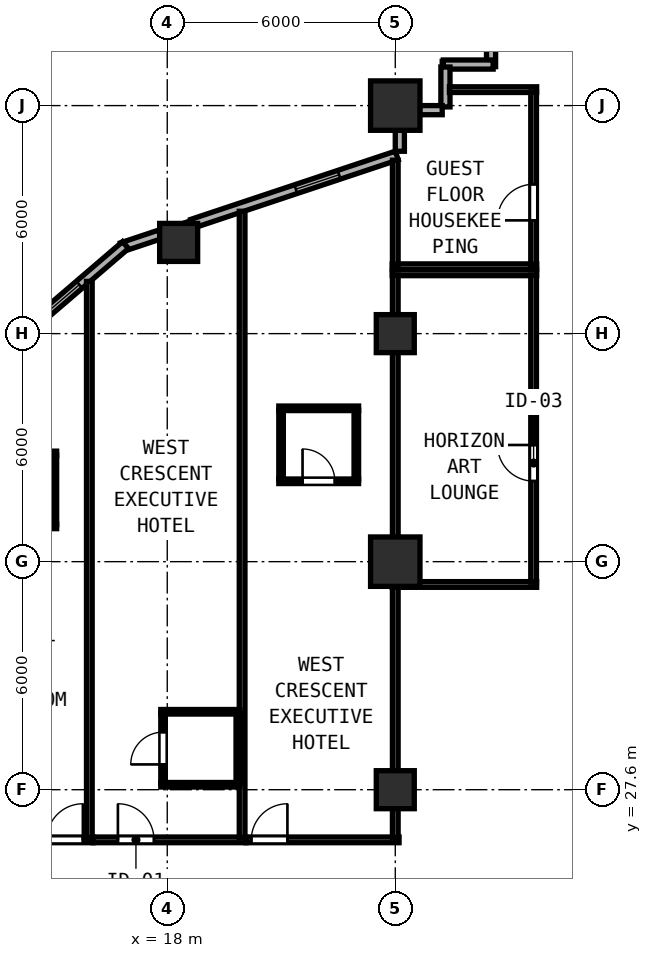
"""IFC4 building model, lengths in metres.
Left out: names, types, materials, properties, quantities, classifications, styles, units other than length and angle.
Written with IfcOpenShell. Run it as: python <this file> out.ifc"""

import sys

from ifc_helpers import new_model, si_unit, direction, frame, frame_2d, origin, origin_2d, place, context, subcontext, project, spatial, rectangle, hollow_rectangle, extrude, element, fill, save


model = new_model("IFC4")
c1 = context("Model", 3, precision=1e-05, world=origin(), true_north=direction((0.0, 1.0)))
c2 = subcontext(c1, "Body", "Model", "MODEL_VIEW")
j1 = project(units=[si_unit("LENGTHUNIT", "METRE"), si_unit("PLANEANGLEUNIT", "RADIAN")], contexts=[c1])
p1 = place(None, origin())
s1 = spatial("IfcSite", under=j1, at=p1, CompositionType="ELEMENT")
p2 = place(p1, origin())
s2 = spatial("IfcBuilding", under=s1, at=p2, CompositionType="ELEMENT")
p3 = place(p2, frame((0.0, 0.0, 39.2)))
s3 = spatial("IfcBuildingStorey", under=s2, at=p3, CompositionType="ELEMENT", Elevation=39.2)
for number, where, z_axis, x_axis in (
    (1, (24.0, 33.6, 0.0), (0.0, 0.0, 1.0), (1.0, 0.0, 0.0)),
    (2, (24.0, 45.6, 0.0), (0.0, 0.0, 1.0), (1.0, 0.0, 0.0)),
):
    element("IfcColumn", number, at=place(p3, frame(where, z_axis=z_axis, x_axis=x_axis)), inside=s3, PredefinedType="COLUMN", context=c2, shape_type="SweptSolid", body=[
        extrude(hollow_rectangle(XDim=1.3, YDim=1.3, WallThickness=0.048, at=origin_2d()), origin(), (0.0, 0.0, 1.0), 3.8),
    ])
for number, where, z_axis, x_axis in (
    (3, (24.0, 27.6, 0.0), (0.0, 0.0, 1.0), (1.0, 0.0, 0.0)),
    (4, (24.0, 39.6, 0.0), (0.0, 0.0, 1.0), (1.0, 0.0, 0.0)),
    (5, (18.3, 42.0, 0.0), (0.0, 0.0, 1.0), (1.0, 0.0, 0.0)),
):
    element("IfcColumn", number, at=place(p3, frame(where, z_axis=z_axis, x_axis=x_axis)), inside=s3, PredefinedType="COLUMN", context=c2, shape_type="SweptSolid", body=[
        extrude(hollow_rectangle(XDim=1.0, YDim=1.0, WallThickness=0.038, at=origin_2d()), origin(), (0.0, 0.0, 1.0), 3.8),
    ])
p4 = place(p3, frame((26.52, 47.995, 0.0), z_axis=(0.0, 0.0, 1.0), x_axis=(0.0, -1.0, 0.0)))
e6 = element("IfcWall", 6, at=p4, inside=s3, PredefinedType="SOLIDWALL", context=c2, shape_type="SweptSolid", body=[
    extrude(rectangle(XDim=1.37, YDim=0.24, at=frame_2d((0.685, 0.0))), origin(), (0.0, 0.0, 1.0), 3.54),
])
p5 = place(p3, frame((26.575, 46.68, 0.0), z_axis=(0.0, 0.0, 1.0), x_axis=(-1.0, 0.0, 0.0)))
e7 = element("IfcWall", 7, at=p5, inside=s3, PredefinedType="SOLIDWALL", context=c2, shape_type="SweptSolid", body=[
    extrude(rectangle(XDim=1.31, YDim=0.24, at=frame_2d((0.655, 0.0))), origin(), (0.0, 0.0, 1.0), 3.54),
])
p6 = place(p3, frame((25.32, 46.615, 0.0), z_axis=(0.0, 0.0, 1.0), x_axis=(0.0, -1.0, 0.0)))
e8 = element("IfcWall", 8, at=p6, inside=s3, PredefinedType="SOLIDWALL", context=c2, shape_type="SweptSolid", body=[
    extrude(rectangle(XDim=1.05, YDim=0.24, at=frame_2d((0.525, 0.0))), origin(), (0.0, 0.0, 1.0), 3.54),
])
p7 = place(p3, frame((25.235, 45.48, 0.0), z_axis=(0.0, 0.0, 1.0), x_axis=(-1.0, 0.0, 0.0)))
e9 = element("IfcWall", 9, at=p7, inside=s3, PredefinedType="SOLIDWALL", context=c2, shape_type="SweptSolid", body=[
    extrude(rectangle(XDim=0.593, YDim=0.24, at=frame_2d((0.296, 0.0))), origin(), (0.0, 0.0, 1.0), 3.54),
])
p8 = place(p3, frame((24.12, 44.958, 0.0), z_axis=(0.0, 0.0, 1.0), x_axis=(0.0, -1.0, 0.0)))
e10 = element("IfcWall", 10, at=p8, inside=s3, PredefinedType="SOLIDWALL", context=c2, shape_type="SweptSolid", body=[
    extrude(rectangle(XDim=0.56, YDim=0.24, at=frame_2d((0.28, 0.0))), origin(), (0.0, 0.0, 1.0), 3.037),
])
p9 = place(p3, frame((24.039, 44.287, 0.0), z_axis=(0.0, 0.0, 1.0), x_axis=(-0.948678995954, -0.316240672014, 0.0)))
e11 = element("IfcWall", 11, at=p9, inside=s3, PredefinedType="SOLIDWALL", context=c2, shape_type="SweptSolid", body=[
    extrude(rectangle(XDim=5.675, YDim=0.24, at=frame_2d((2.837, 0.0))), origin(), (0.0, 0.0, 1.0), 3.037),
])
p10 = place(p9, frame((1.6, 0.0, 0.85)))
e12 = element("IfcOpeningElement", 12, at=p10, cuts=e11, PredefinedType="OPENING", context=c2, shape_type="SweptSolid", body=[
    extrude(rectangle(XDim=1.2, YDim=1.85, at=frame_2d((0.6, 0.925))), frame((0.0, 0.13, 0.0), z_axis=(0.0, -1.0, 0.0), x_axis=(1.0, 0.0, 0.0)), (0.0, 0.0, 1.0), 0.26),
])
p11 = place(p3, frame((17.808, 42.209, 0.0), z_axis=(0.0, 0.0, 1.0), x_axis=(-0.948706457285, -0.316158279832, 0.0)))
e13 = element("IfcWall", 13, at=p11, inside=s3, PredefinedType="SOLIDWALL", context=c2, shape_type="SweptSolid", body=[
    extrude(rectangle(XDim=1.054, YDim=0.24, at=frame_2d((0.527, 0.0))), origin(), (0.0, 0.0, 1.0), 3.54),
])
p12 = place(p3, frame((16.902, 41.929, 0.0), z_axis=(0.0, 0.0, 1.0), x_axis=(-0.759275136126, -0.650769750112, 0.0)))
e14 = element("IfcWall", 14, at=p12, inside=s3, PredefinedType="SOLIDWALL", context=c2, shape_type="SweptSolid", body=[
    extrude(rectangle(XDim=3.719, YDim=0.24, at=frame_2d((1.86, 0.0))), origin(), (0.0, 0.0, 1.0), 3.54),
])
p13 = place(p12, frame((1.6, 0.0, 0.85)))
e15 = element("IfcOpeningElement", 15, at=p13, cuts=e14, PredefinedType="OPENING", context=c2, shape_type="SweptSolid", body=[
    extrude(rectangle(XDim=1.2, YDim=1.85, at=frame_2d((0.6, 0.925))), frame((0.0, 0.13, 0.0), z_axis=(0.0, -1.0, 0.0), x_axis=(1.0, 0.0, 0.0)), (0.0, 0.0, 1.0), 0.26),
])
for number, where, z_axis, x_axis in (
    (16, (23.92, 41.2, 0.0), (0.0, 0.0, 1.0), (1.0, 0.0, 0.0)),
    (17, (23.92, 33.0, 0.0), (0.0, 0.0, 1.0), (1.0, 0.0, 0.0)),
):
    element("IfcWall", number, at=place(p3, frame(where, z_axis=z_axis, x_axis=x_axis)), inside=s3, PredefinedType="PARTITIONING", context=c2, shape_type="SweptSolid", body=[
        extrude(rectangle(XDim=3.8, YDim=0.15, at=frame_2d((1.9, 0.0))), origin(), (0.0, 0.0, 1.0), 3.54),
    ])
p14 = place(p3, frame((24.0, 33.06, 0.0), z_axis=(0.0, 0.0, 1.0), x_axis=(0.0, 1.0, 0.0)))
e18 = element("IfcWall", 18, at=p14, inside=s3, PredefinedType="PARTITIONING", context=c2, shape_type="SweptSolid", body=[
    extrude(rectangle(XDim=8.08, YDim=0.15, at=frame_2d((4.04, 0.0))), origin(), (0.0, 0.0, 1.0), 3.037),
])
p15 = place(p3, frame((27.64, 33.06, 0.0), z_axis=(0.0, 0.0, 1.0), x_axis=(0.0, 1.0, 0.0)))
e19 = element("IfcWall", 19, at=p15, inside=s3, PredefinedType="PARTITIONING", context=c2, shape_type="SweptSolid", body=[
    extrude(rectangle(XDim=8.08, YDim=0.15, at=frame_2d((4.04, 0.0))), origin(), (0.0, 0.0, 1.0), 3.54),
])
p16 = place(p15, frame((3.61, 0.0, 0.0), z_axis=(0.0, 0.0, 1.0), x_axis=(-1.0, 0.0, 0.0)))
e20 = element("IfcOpeningElement", 20, at=p16, cuts=e19, PredefinedType="OPENING", context=c2, shape_type="SweptSolid", body=[
    extrude(rectangle(XDim=0.95, YDim=2.12, at=frame_2d((0.475, 1.06))), frame((0.0, 0.085, 0.0), z_axis=(0.0, -1.0, 0.0), x_axis=(1.0, 0.0, 0.0)), (0.0, 0.0, 1.0), 0.17),
])
p17 = place(p3, frame((25.425, 46.02, 0.0), z_axis=(0.0, 0.0, 1.0), x_axis=(1.0, 0.0, 0.0)))
e21 = element("IfcWall", 21, at=p17, inside=s3, PredefinedType="PARTITIONING", context=c2, shape_type="SweptSolid", body=[
    extrude(rectangle(XDim=2.295, YDim=0.15, at=frame_2d((1.147, 0.0))), origin(), (0.0, 0.0, 1.0), 3.54),
])
p18 = place(p3, frame((23.92, 41.36, 0.0), z_axis=(0.0, 0.0, 1.0), x_axis=(1.0, 0.0, 0.0)))
e22 = element("IfcWall", 22, at=p18, inside=s3, PredefinedType="PARTITIONING", context=c2, shape_type="SweptSolid", body=[
    extrude(rectangle(XDim=3.8, YDim=0.15, at=frame_2d((1.9, 0.0))), origin(), (0.0, 0.0, 1.0), 3.54),
])
p19 = place(p3, frame((24.0, 41.42, 0.0), z_axis=(0.0, 0.0, 1.0), x_axis=(0.0, 1.0, 0.0)))
e23 = element("IfcWall", 23, at=p19, inside=s3, PredefinedType="PARTITIONING", context=c2, shape_type="SweptSolid", body=[
    extrude(rectangle(XDim=2.743, YDim=0.15, at=frame_2d((1.372, 0.0))), origin(), (0.0, 0.0, 1.0), 3.037),
])
p20 = place(p3, frame((27.64, 41.42, 0.0), z_axis=(0.0, 0.0, 1.0), x_axis=(0.0, 1.0, 0.0)))
e24 = element("IfcWall", 24, at=p20, inside=s3, PredefinedType="PARTITIONING", context=c2, shape_type="SweptSolid", body=[
    extrude(rectangle(XDim=4.54, YDim=0.15, at=frame_2d((2.27, 0.0))), origin(), (0.0, 0.0, 1.0), 3.54),
])
p21 = place(p20, frame((2.11, 0.0, 0.0), z_axis=(0.0, 0.0, 1.0), x_axis=(-1.0, 0.0, 0.0)))
e25 = element("IfcOpeningElement", 25, at=p21, cuts=e24, PredefinedType="OPENING", context=c2, shape_type="SweptSolid", body=[
    extrude(rectangle(XDim=0.95, YDim=2.12, at=frame_2d((0.475, 1.06))), frame((0.0, 0.085, 0.0), z_axis=(0.0, -1.0, 0.0), x_axis=(1.0, 0.0, 0.0)), (0.0, 0.0, 1.0), 0.17),
])
p22 = place(p3, frame((11.7, 26.28, 0.0), z_axis=(0.0, 0.0, 1.0), x_axis=(1.0, 0.0, 0.0)))
e26 = element("IfcWall", 26, at=p22, inside=s3, PredefinedType="PARTITIONING", context=c2, shape_type="SweptSolid", body=[
    extrude(rectangle(XDim=4.35, YDim=0.15, at=frame_2d((2.175, 0.0))), origin(), (0.0, 0.0, 1.0), 3.54),
])
p23 = place(p22, frame((3.13, 0.0, 0.0)))
e27 = element("IfcOpeningElement", 27, at=p23, cuts=e26, PredefinedType="OPENING", context=c2, shape_type="SweptSolid", body=[
    extrude(rectangle(XDim=0.95, YDim=2.15, at=frame_2d((0.475, 1.075))), frame((0.0, 0.085, 0.0), z_axis=(0.0, -1.0, 0.0), x_axis=(1.0, 0.0, 0.0)), (0.0, 0.0, 1.0), 0.17),
])
p24 = place(p3, frame((15.95, 26.34, 0.0), z_axis=(0.0, 0.0, 1.0), x_axis=(0.0, 1.0, 0.0)))
e28 = element("IfcWall", 28, at=p24, inside=s3, PredefinedType="PARTITIONING", context=c2, shape_type="SweptSolid", body=[
    extrude(rectangle(XDim=14.635, YDim=0.15, at=frame_2d((7.317, 0.0))), origin(), (0.0, 0.0, 1.0), 3.54),
])
p25 = place(p3, frame((12.99, 36.448, 0.0), z_axis=(0.0, 0.0, 1.0), x_axis=(1.0, 0.0, 0.0)))
e29 = element("IfcWall", 29, at=p25, inside=s3, PredefinedType="PARTITIONING", context=c2, shape_type="SweptSolid", body=[
    extrude(rectangle(XDim=2.1, YDim=0.12, at=frame_2d((1.05, 0.0))), origin(), (0.0, 0.0, 1.0), 3.54),
])
p26 = place(p3, frame((12.99, 34.528, 0.0), z_axis=(0.0, 0.0, 1.0), x_axis=(1.0, 0.0, 0.0)))
e30 = element("IfcWall", 30, at=p26, inside=s3, PredefinedType="PARTITIONING", context=c2, shape_type="SweptSolid", body=[
    extrude(rectangle(XDim=2.1, YDim=0.12, at=frame_2d((1.05, 0.0))), origin(), (0.0, 0.0, 1.0), 3.54),
])
p27 = place(p26, frame((0.625, 0.0, 0.0)))
e31 = element("IfcOpeningElement", 31, at=p27, cuts=e30, PredefinedType="OPENING", context=c2, shape_type="SweptSolid", body=[
    extrude(rectangle(XDim=0.85, YDim=2.1, at=frame_2d((0.425, 1.05))), frame((0.0, 0.07, 0.0), z_axis=(0.0, -1.0, 0.0), x_axis=(1.0, 0.0, 0.0)), (0.0, 0.0, 1.0), 0.14),
])
p28 = place(p3, frame((15.03, 34.573, 0.0), z_axis=(0.0, 0.0, 1.0), x_axis=(0.0, 1.0, 0.0)))
e32 = element("IfcWall", 32, at=p28, inside=s3, PredefinedType="PARTITIONING", context=c2, shape_type="SweptSolid", body=[
    extrude(rectangle(XDim=1.83, YDim=0.12, at=frame_2d((0.915, 0.0))), origin(), (0.0, 0.0, 1.0), 3.54),
])
p29 = place(p3, frame((16.052, 26.28, 0.0), z_axis=(0.0, 0.0, 1.0), x_axis=(1.0, 0.0, 0.0)))
e33 = element("IfcWall", 33, at=p29, inside=s3, PredefinedType="PARTITIONING", context=c2, shape_type="SweptSolid", body=[
    extrude(rectangle(XDim=4.018, YDim=0.15, at=frame_2d((2.009, 0.0))), origin(), (0.0, 0.0, 1.0), 3.54),
])
p30 = place(p29, frame((0.649, 0.0, 0.0)))
e34 = element("IfcOpeningElement", 34, at=p30, cuts=e33, PredefinedType="OPENING", context=c2, shape_type="SweptSolid", body=[
    extrude(rectangle(XDim=0.95, YDim=2.18, at=frame_2d((0.475, 1.09))), frame((0.0, 0.085, 0.0), z_axis=(0.0, -1.0, 0.0), x_axis=(1.0, 0.0, 0.0)), (0.0, 0.0, 1.0), 0.17),
])
p31 = place(p3, frame((19.97, 26.34, 0.0), z_axis=(0.0, 0.0, 1.0), x_axis=(0.0, 1.0, 0.0)))
e35 = element("IfcWall", 35, at=p31, inside=s3, PredefinedType="PARTITIONING", context=c2, shape_type="SweptSolid", body=[
    extrude(rectangle(XDim=16.479, YDim=0.15, at=frame_2d((8.24, 0.0))), origin(), (0.0, 0.0, 1.0), 3.54),
])
p32 = place(p3, frame((17.83, 29.65, 0.0), z_axis=(0.0, 0.0, 1.0), x_axis=(1.0, 0.0, 0.0)))
e36 = element("IfcWall", 36, at=p32, inside=s3, PredefinedType="PARTITIONING", context=c2, shape_type="SweptSolid", body=[
    extrude(rectangle(XDim=2.08, YDim=0.12, at=frame_2d((1.04, 0.0))), origin(), (0.0, 0.0, 1.0), 3.54),
])
p33 = place(p3, frame((17.83, 27.73, 0.0), z_axis=(0.0, 0.0, 1.0), x_axis=(1.0, 0.0, 0.0)))
e37 = element("IfcWall", 37, at=p33, inside=s3, PredefinedType="PARTITIONING", context=c2, shape_type="SweptSolid", body=[
    extrude(rectangle(XDim=2.08, YDim=0.12, at=frame_2d((1.04, 0.0))), origin(), (0.0, 0.0, 1.0), 3.037),
])
p34 = place(p3, frame((17.89, 27.775, 0.0), z_axis=(0.0, 0.0, 1.0), x_axis=(0.0, 1.0, 0.0)))
e38 = element("IfcWall", 38, at=p34, inside=s3, PredefinedType="PARTITIONING", context=c2, shape_type="SweptSolid", body=[
    extrude(rectangle(XDim=1.83, YDim=0.12, at=frame_2d((0.915, 0.0))), origin(), (0.0, 0.0, 1.0), 3.54),
])
p35 = place(p34, frame((1.34, 0.0, 0.0), z_axis=(0.0, 0.0, 1.0), x_axis=(-1.0, 0.0, 0.0)))
e39 = element("IfcOpeningElement", 39, at=p35, cuts=e38, PredefinedType="OPENING", context=c2, shape_type="SweptSolid", body=[
    extrude(rectangle(XDim=0.85, YDim=2.1, at=frame_2d((0.425, 1.05))), frame((0.0, 0.07, 0.0), z_axis=(0.0, -1.0, 0.0), x_axis=(1.0, 0.0, 0.0)), (0.0, 0.0, 1.0), 0.14),
])
p36 = place(p3, frame((19.87, 27.775, 0.0), z_axis=(0.0, 0.0, 1.0), x_axis=(0.0, 1.0, 0.0)))
e40 = element("IfcWall", 40, at=p36, inside=s3, PredefinedType="PARTITIONING", context=c2, shape_type="SweptSolid", body=[
    extrude(rectangle(XDim=1.83, YDim=0.12, at=frame_2d((0.915, 0.0))), origin(), (0.0, 0.0, 1.0), 3.54),
])
p37 = place(p3, frame((20.072, 26.28, 0.0), z_axis=(0.0, 0.0, 1.0), x_axis=(1.0, 0.0, 0.0)))
e41 = element("IfcWall", 41, at=p37, inside=s3, PredefinedType="PARTITIONING", context=c2, shape_type="SweptSolid", body=[
    extrude(rectangle(XDim=4.028, YDim=0.15, at=frame_2d((2.014, 0.0))), origin(), (0.0, 0.0, 1.0), 3.54),
])
p38 = place(p37, frame((0.14, 0.0, 0.0)))
e42 = element("IfcOpeningElement", 42, at=p38, cuts=e41, PredefinedType="OPENING", context=c2, shape_type="SweptSolid", body=[
    extrude(rectangle(XDim=0.95, YDim=2.18, at=frame_2d((0.475, 1.09))), frame((0.0, 0.085, 0.0), z_axis=(0.0, -1.0, 0.0), x_axis=(1.0, 0.0, 0.0)), (0.0, 0.0, 1.0), 0.17),
])
p39 = place(p3, frame((24.0, 26.34, 0.0), z_axis=(0.0, 0.0, 1.0), x_axis=(0.0, 1.0, 0.0)))
e43 = element("IfcWall", 43, at=p39, inside=s3, PredefinedType="PARTITIONING", context=c2, shape_type="SweptSolid", body=[
    extrude(rectangle(XDim=6.6, YDim=0.15, at=frame_2d((3.3, 0.0))), origin(), (0.0, 0.0, 1.0), 3.037),
])
p40 = place(p3, frame((20.935, 37.635, 0.0), z_axis=(0.0, 0.0, 1.0), x_axis=(1.0, 0.0, 0.0)))
e44 = element("IfcWall", 44, at=p40, inside=s3, PredefinedType="PARTITIONING", context=c2, shape_type="SweptSolid", body=[
    extrude(rectangle(XDim=2.1, YDim=0.12, at=frame_2d((1.05, 0.0))), origin(), (0.0, 0.0, 1.0), 3.54),
])
p41 = place(p3, frame((20.935, 35.715, 0.0), z_axis=(0.0, 0.0, 1.0), x_axis=(1.0, 0.0, 0.0)))
e45 = element("IfcWall", 45, at=p41, inside=s3, PredefinedType="PARTITIONING", context=c2, shape_type="SweptSolid", body=[
    extrude(rectangle(XDim=2.1, YDim=0.12, at=frame_2d((1.05, 0.0))), origin(), (0.0, 0.0, 1.0), 3.54),
])
p42 = place(p41, frame((0.625, 0.0, 0.0)))
e46 = element("IfcOpeningElement", 46, at=p42, cuts=e45, PredefinedType="OPENING", context=c2, shape_type="SweptSolid", body=[
    extrude(rectangle(XDim=0.85, YDim=2.1, at=frame_2d((0.425, 1.05))), frame((0.0, 0.07, 0.0), z_axis=(0.0, -1.0, 0.0), x_axis=(1.0, 0.0, 0.0)), (0.0, 0.0, 1.0), 0.14),
])
for number, where, z_axis, x_axis in (
    (47, (20.995, 35.76, 0.0), (0.0, 0.0, 1.0), (0.0, 1.0, 0.0)),
    (48, (22.975, 35.76, 0.0), (0.0, 0.0, 1.0), (0.0, 1.0, 0.0)),
):
    element("IfcWall", number, at=place(p3, frame(where, z_axis=z_axis, x_axis=x_axis)), inside=s3, PredefinedType="PARTITIONING", context=c2, shape_type="SweptSolid", body=[
        extrude(rectangle(XDim=1.83, YDim=0.12, at=frame_2d((0.915, 0.0))), origin(), (0.0, 0.0, 1.0), 3.54),
    ])
p43 = place(p10, origin())
e49 = element("IfcWindow", 49, at=p43, inside=s3, PartitioningType="SINGLE_PANEL", PredefinedType="WINDOW", context=c2, shape_type="SweptSolid", body=[
    extrude(rectangle(XDim=1.2, YDim=1.85, at=frame_2d((0.6, 0.925))), frame((0.0, 0.03, 0.0), z_axis=(0.0, -1.0, 0.0), x_axis=(1.0, 0.0, 0.0)), (0.0, 0.0, 1.0), 0.06),
])
fill(e12, e49)
p44 = place(p13, origin())
e50 = element("IfcWindow", 50, at=p44, inside=s3, PartitioningType="SINGLE_PANEL", PredefinedType="WINDOW", context=c2, shape_type="SweptSolid", body=[
    extrude(rectangle(XDim=1.2, YDim=1.85, at=frame_2d((0.6, 0.925))), frame((0.0, 0.03, 0.0), z_axis=(0.0, -1.0, 0.0), x_axis=(1.0, 0.0, 0.0)), (0.0, 0.0, 1.0), 0.06),
])
fill(e15, e50)
p45 = place(p16, origin())
e51 = element("IfcDoor", 51, at=p45, inside=s3, OperationType="SINGLE_SWING_LEFT", PredefinedType="DOOR", context=c2, shape_type="SweptSolid", body=[
    extrude(rectangle(XDim=0.95, YDim=2.12, at=frame_2d((0.475, 1.06))), frame((0.0, 0.025, 0.0), z_axis=(0.0, -1.0, 0.0), x_axis=(1.0, 0.0, 0.0)), (0.0, 0.0, 1.0), 0.05),
])
fill(e20, e51)
p46 = place(p21, origin())
e52 = element("IfcDoor", 52, at=p46, inside=s3, OperationType="SINGLE_SWING_RIGHT", PredefinedType="DOOR", context=c2, shape_type="SweptSolid", body=[
    extrude(rectangle(XDim=0.95, YDim=2.12, at=frame_2d((0.475, 1.06))), frame((0.0, 0.025, 0.0), z_axis=(0.0, -1.0, 0.0), x_axis=(1.0, 0.0, 0.0)), (0.0, 0.0, 1.0), 0.05),
])
fill(e25, e52)
p47 = place(p23, origin())
e53 = element("IfcDoor", 53, at=p47, inside=s3, OperationType="SINGLE_SWING_RIGHT", PredefinedType="DOOR", context=c2, shape_type="SweptSolid", body=[
    extrude(rectangle(XDim=0.95, YDim=2.15, at=frame_2d((0.475, 1.075))), frame((0.0, 0.025, 0.0), z_axis=(0.0, -1.0, 0.0), x_axis=(1.0, 0.0, 0.0)), (0.0, 0.0, 1.0), 0.05),
])
fill(e27, e53)
p48 = place(p30, origin())
e54 = element("IfcDoor", 54, at=p48, inside=s3, OperationType="SINGLE_SWING_LEFT", PredefinedType="DOOR", context=c2, shape_type="SweptSolid", body=[
    extrude(rectangle(XDim=0.95, YDim=2.18, at=frame_2d((0.475, 1.09))), frame((0.0, 0.025, 0.0), z_axis=(0.0, -1.0, 0.0), x_axis=(1.0, 0.0, 0.0)), (0.0, 0.0, 1.0), 0.05),
])
fill(e34, e54)
p49 = place(p35, origin())
e55 = element("IfcDoor", 55, at=p49, inside=s3, OperationType="SINGLE_SWING_RIGHT", PredefinedType="DOOR", context=c2, shape_type="SweptSolid", body=[
    extrude(rectangle(XDim=0.85, YDim=2.1, at=frame_2d((0.425, 1.05))), frame((0.0, 0.025, 0.0), z_axis=(0.0, -1.0, 0.0), x_axis=(1.0, 0.0, 0.0)), (0.0, 0.0, 1.0), 0.05),
])
fill(e39, e55)
p50 = place(p38, origin())
e56 = element("IfcDoor", 56, at=p50, inside=s3, OperationType="SINGLE_SWING_RIGHT", PredefinedType="DOOR", context=c2, shape_type="SweptSolid", body=[
    extrude(rectangle(XDim=0.95, YDim=2.18, at=frame_2d((0.475, 1.09))), frame((0.0, 0.025, 0.0), z_axis=(0.0, -1.0, 0.0), x_axis=(1.0, 0.0, 0.0)), (0.0, 0.0, 1.0), 0.05),
])
fill(e42, e56)
p51 = place(p42, origin())
e57 = element("IfcDoor", 57, at=p51, inside=s3, OperationType="SINGLE_SWING_LEFT", PredefinedType="DOOR", context=c2, shape_type="SweptSolid", body=[
    extrude(rectangle(XDim=0.85, YDim=2.1, at=frame_2d((0.425, 1.05))), frame((0.0, 0.025, 0.0), z_axis=(0.0, -1.0, 0.0), x_axis=(1.0, 0.0, 0.0)), (0.0, 0.0, 1.0), 0.05),
])
fill(e46, e57)
save(model, sys.argv[1])
